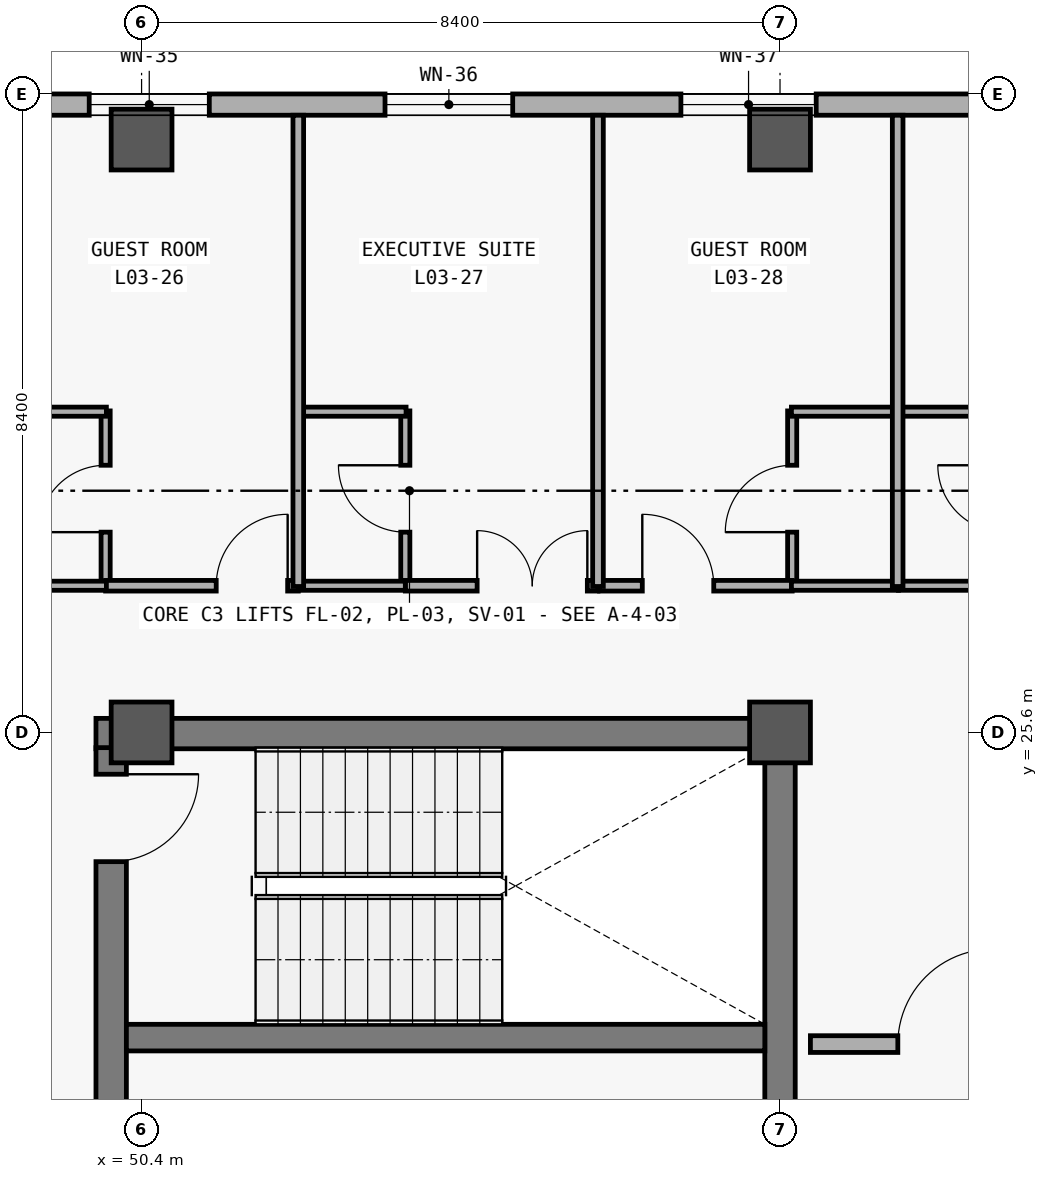
"""IFC4 building model, lengths in metres.
Left out: names, types, materials, properties, quantities, classifications, styles, units other than length and angle.
Written with IfcOpenShell. Run it as: python <this file> out.ifc"""

import sys

from ifc_helpers import new_model, si_unit, direction, frame, frame_2d, origin, origin_2d, place, context, subcontext, project, spatial, rectangle, extrude, element, fill, save


model = new_model("IFC4")
c1 = context("Model", 3, precision=1e-05, world=origin(), true_north=direction((0.0, 1.0)))
c2 = subcontext(c1, "Body", "Model", "MODEL_VIEW")
j1 = project(units=[si_unit("LENGTHUNIT", "METRE"), si_unit("PLANEANGLEUNIT", "RADIAN")], contexts=[c1])
p1 = place(None, origin())
s1 = spatial("IfcSite", under=j1, at=p1, CompositionType="ELEMENT")
p2 = place(p1, origin())
s2 = spatial("IfcBuilding", under=s1, at=p2, CompositionType="ELEMENT")
p3 = place(p2, frame((0.0, 0.0, 15.0)))
s3 = spatial("IfcBuildingStorey", under=s2, at=p3, CompositionType="ELEMENT", Elevation=15.0)
for number, where, z_axis, x_axis in (
    (1, (50.4, 25.6, 0.0), (0.0, 0.0, 1.0), (1.0, 0.0, 0.0)),
    (2, (50.4, 33.4, 0.0), (0.0, 0.0, 1.0), (1.0, 0.0, 0.0)),
    (3, (58.8, 25.6, 0.0), (0.0, 0.0, 1.0), (1.0, 0.0, 0.0)),
    (4, (58.8, 33.4, 0.0), (0.0, 0.0, 1.0), (1.0, 0.0, 0.0)),
):
    element("IfcColumn", number, at=place(p3, frame(where, z_axis=z_axis, x_axis=x_axis)), inside=s3, PredefinedType="COLUMN", context=c2, shape_type="SweptSolid", body=[
        extrude(rectangle(XDim=0.8, YDim=0.8, at=origin_2d()), origin(), (0.0, 0.0, 1.0), 4.2),
    ])
p4 = place(p3, frame((8.68, 33.86, 0.0), z_axis=(0.0, 0.0, 1.0), x_axis=(1.0, 0.0, 0.0)))
e5 = element("IfcWall", 5, at=p4, inside=s3, PredefinedType="SOLIDWALL", context=c2, shape_type="SweptSolid", body=[
    extrude(rectangle(XDim=83.44, YDim=0.28, at=frame_2d((41.72, 0.0))), origin(), (0.0, 0.0, 1.0), 3.92),
])
p5 = place(p4, frame((4.895, 0.0, 0.85)))
e6 = element("IfcOpeningElement", 6, at=p5, cuts=e5, PredefinedType="OPENING", context=c2, shape_type="SweptSolid", body=[
    extrude(rectangle(XDim=2.6, YDim=2.2, at=frame_2d((1.3, 1.1))), frame((0.0, 0.15, 0.0), z_axis=(0.0, -1.0, 0.0), x_axis=(1.0, 0.0, 0.0)), (0.0, 0.0, 1.0), 0.3),
])
p6 = place(p4, frame((13.371, 0.0, 0.85)))
e7 = element("IfcOpeningElement", 7, at=p6, cuts=e5, PredefinedType="OPENING", context=c2, shape_type="SweptSolid", body=[
    extrude(rectangle(XDim=1.7, YDim=2.0, at=frame_2d((0.85, 1.0))), frame((0.0, 0.15, 0.0), z_axis=(0.0, -1.0, 0.0), x_axis=(1.0, 0.0, 0.0)), (0.0, 0.0, 1.0), 0.3),
])
p7 = place(p4, frame((17.015, 0.0, 0.85)))
e8 = element("IfcOpeningElement", 8, at=p7, cuts=e5, PredefinedType="OPENING", context=c2, shape_type="SweptSolid", body=[
    extrude(rectangle(XDim=2.3, YDim=2.05, at=frame_2d((1.15, 1.025))), frame((0.0, 0.15, 0.0), z_axis=(0.0, -1.0, 0.0), x_axis=(1.0, 0.0, 0.0)), (0.0, 0.0, 1.0), 0.3),
])
p8 = place(p4, frame((20.732, 0.0, 0.85)))
e9 = element("IfcOpeningElement", 9, at=p8, cuts=e5, PredefinedType="OPENING", context=c2, shape_type="SweptSolid", body=[
    extrude(rectangle(XDim=2.75, YDim=2.1, at=frame_2d((1.375, 1.05))), frame((0.0, 0.15, 0.0), z_axis=(0.0, -1.0, 0.0), x_axis=(1.0, 0.0, 0.0)), (0.0, 0.0, 1.0), 0.3),
])
p9 = place(p4, frame((25.46, 0.0, 0.85)))
e10 = element("IfcOpeningElement", 10, at=p9, cuts=e5, PredefinedType="OPENING", context=c2, shape_type="SweptSolid", body=[
    extrude(rectangle(XDim=1.18, YDim=1.5, at=frame_2d((0.59, 0.75))), frame((0.0, 0.15, 0.0), z_axis=(0.0, -1.0, 0.0), x_axis=(1.0, 0.0, 0.0)), (0.0, 0.0, 1.0), 0.3),
])
p10 = place(p4, frame((29.352, 0.0, 0.85)))
e11 = element("IfcOpeningElement", 11, at=p10, cuts=e5, PredefinedType="OPENING", context=c2, shape_type="SweptSolid", body=[
    extrude(rectangle(XDim=1.28, YDim=1.6, at=frame_2d((0.64, 0.8))), frame((0.0, 0.15, 0.0), z_axis=(0.0, -1.0, 0.0), x_axis=(1.0, 0.0, 0.0)), (0.0, 0.0, 1.0), 0.3),
])
p11 = place(p4, frame((33.245, 0.0, 0.85)))
e12 = element("IfcOpeningElement", 12, at=p11, cuts=e5, PredefinedType="OPENING", context=c2, shape_type="SweptSolid", body=[
    extrude(rectangle(XDim=1.38, YDim=1.7, at=frame_2d((0.69, 0.85))), frame((0.0, 0.15, 0.0), z_axis=(0.0, -1.0, 0.0), x_axis=(1.0, 0.0, 0.0)), (0.0, 0.0, 1.0), 0.3),
])
p12 = place(p4, frame((37.138, 0.0, 0.85)))
e13 = element("IfcOpeningElement", 13, at=p12, cuts=e5, PredefinedType="OPENING", context=c2, shape_type="SweptSolid", body=[
    extrude(rectangle(XDim=1.48, YDim=1.8, at=frame_2d((0.74, 0.9))), frame((0.0, 0.15, 0.0), z_axis=(0.0, -1.0, 0.0), x_axis=(1.0, 0.0, 0.0)), (0.0, 0.0, 1.0), 0.3),
])
p13 = place(p4, frame((41.031, 0.0, 0.85)))
e14 = element("IfcOpeningElement", 14, at=p13, cuts=e5, PredefinedType="OPENING", context=c2, shape_type="SweptSolid", body=[
    extrude(rectangle(XDim=1.58, YDim=1.85, at=frame_2d((0.79, 0.925))), frame((0.0, 0.15, 0.0), z_axis=(0.0, -1.0, 0.0), x_axis=(1.0, 0.0, 0.0)), (0.0, 0.0, 1.0), 0.3),
])
p14 = place(p4, frame((44.923, 0.0, 0.85)))
e15 = element("IfcOpeningElement", 15, at=p14, cuts=e5, PredefinedType="OPENING", context=c2, shape_type="SweptSolid", body=[
    extrude(rectangle(XDim=1.68, YDim=1.9, at=frame_2d((0.84, 0.95))), frame((0.0, 0.15, 0.0), z_axis=(0.0, -1.0, 0.0), x_axis=(1.0, 0.0, 0.0)), (0.0, 0.0, 1.0), 0.3),
])
p15 = place(p4, frame((48.816, 0.0, 0.85)))
e16 = element("IfcOpeningElement", 16, at=p15, cuts=e5, PredefinedType="OPENING", context=c2, shape_type="SweptSolid", body=[
    extrude(rectangle(XDim=1.78, YDim=1.95, at=frame_2d((0.89, 0.975))), frame((0.0, 0.15, 0.0), z_axis=(0.0, -1.0, 0.0), x_axis=(1.0, 0.0, 0.0)), (0.0, 0.0, 1.0), 0.3),
])
p16 = place(p4, frame((52.71, 0.0, 0.85)))
e17 = element("IfcOpeningElement", 17, at=p16, cuts=e5, PredefinedType="OPENING", context=c2, shape_type="SweptSolid", body=[
    extrude(rectangle(XDim=1.88, YDim=1.95, at=frame_2d((0.94, 0.975))), frame((0.0, 0.15, 0.0), z_axis=(0.0, -1.0, 0.0), x_axis=(1.0, 0.0, 0.0)), (0.0, 0.0, 1.0), 0.3),
])
p17 = place(p4, frame((56.567, 0.0, 0.85)))
e18 = element("IfcOpeningElement", 18, at=p17, cuts=e5, PredefinedType="OPENING", context=c2, shape_type="SweptSolid", body=[
    extrude(rectangle(XDim=2.05, YDim=1.95, at=frame_2d((1.025, 0.975))), frame((0.0, 0.15, 0.0), z_axis=(0.0, -1.0, 0.0), x_axis=(1.0, 0.0, 0.0)), (0.0, 0.0, 1.0), 0.3),
])
p18 = place(p4, frame((60.444, 0.0, 0.85)))
e19 = element("IfcOpeningElement", 19, at=p18, cuts=e5, PredefinedType="OPENING", context=c2, shape_type="SweptSolid", body=[
    extrude(rectangle(XDim=2.18, YDim=1.95, at=frame_2d((1.09, 0.975))), frame((0.0, 0.15, 0.0), z_axis=(0.0, -1.0, 0.0), x_axis=(1.0, 0.0, 0.0)), (0.0, 0.0, 1.0), 0.3),
])
p19 = place(p4, frame((64.287, 0.0, 0.85)))
e20 = element("IfcOpeningElement", 20, at=p19, cuts=e5, PredefinedType="OPENING", context=c2, shape_type="SweptSolid", body=[
    extrude(rectangle(XDim=2.38, YDim=1.95, at=frame_2d((1.19, 0.975))), frame((0.0, 0.15, 0.0), z_axis=(0.0, -1.0, 0.0), x_axis=(1.0, 0.0, 0.0)), (0.0, 0.0, 1.0), 0.3),
])
p20 = place(p4, frame((68.181, 0.0, 0.85)))
e21 = element("IfcOpeningElement", 21, at=p20, cuts=e5, PredefinedType="OPENING", context=c2, shape_type="SweptSolid", body=[
    extrude(rectangle(XDim=2.48, YDim=2.0, at=frame_2d((1.24, 1.0))), frame((0.0, 0.15, 0.0), z_axis=(0.0, -1.0, 0.0), x_axis=(1.0, 0.0, 0.0)), (0.0, 0.0, 1.0), 0.3),
])
p21 = place(p4, frame((72.038, 0.0, 0.85)))
e22 = element("IfcOpeningElement", 22, at=p21, cuts=e5, PredefinedType="OPENING", context=c2, shape_type="SweptSolid", body=[
    extrude(rectangle(XDim=2.65, YDim=2.0, at=frame_2d((1.325, 1.0))), frame((0.0, 0.15, 0.0), z_axis=(0.0, -1.0, 0.0), x_axis=(1.0, 0.0, 0.0)), (0.0, 0.0, 1.0), 0.3),
])
p22 = place(p4, frame((75.831, 0.0, 0.85)))
e23 = element("IfcOpeningElement", 23, at=p22, cuts=e5, PredefinedType="OPENING", context=c2, shape_type="SweptSolid", body=[
    extrude(rectangle(XDim=2.95, YDim=2.05, at=frame_2d((1.475, 1.025))), frame((0.0, 0.15, 0.0), z_axis=(0.0, -1.0, 0.0), x_axis=(1.0, 0.0, 0.0)), (0.0, 0.0, 1.0), 0.3),
])
p23 = place(p4, frame((80.349, 0.0, 0.85)))
e24 = element("IfcOpeningElement", 24, at=p23, cuts=e5, PredefinedType="OPENING", context=c2, shape_type="SweptSolid", body=[
    extrude(rectangle(XDim=1.8, YDim=1.8, at=frame_2d((0.9, 0.9))), frame((0.0, 0.15, 0.0), z_axis=(0.0, -1.0, 0.0), x_axis=(1.0, 0.0, 0.0)), (0.0, 0.0, 1.0), 0.3),
])
p24 = place(p3, frame((59.0, 25.585, 0.0), z_axis=(0.0, 0.0, 1.0), x_axis=(-1.0, 0.0, 0.0)))
e25 = element("IfcWall", 25, at=p24, inside=s3, PredefinedType="SHEAR", context=c2, shape_type="SweptSolid", body=[
    extrude(rectangle(XDim=9.2, YDim=0.4, at=frame_2d((4.6, 0.0))), origin(), (0.0, 0.0, 1.0), 3.92),
])
p25 = place(p3, frame((50.0, 25.4, 0.0), z_axis=(0.0, 0.0, 1.0), x_axis=(0.0, -1.0, 0.0)))
e26 = element("IfcWall", 26, at=p25, inside=s3, PredefinedType="SHEAR", context=c2, shape_type="SweptSolid", body=[
    extrude(rectangle(XDim=7.4, YDim=0.4, at=frame_2d((3.7, 0.0))), origin(), (0.0, 0.0, 1.0), 3.92),
])
p26 = place(p25, frame((0.35, 0.0, 0.0)))
e27 = element("IfcOpeningElement", 27, at=p26, cuts=e26, PredefinedType="OPENING", context=c2, shape_type="SweptSolid", body=[
    extrude(rectangle(XDim=1.15, YDim=2.2, at=frame_2d((0.575, 1.1))), frame((0.0, 0.21, 0.0), z_axis=(0.0, -1.0, 0.0), x_axis=(1.0, 0.0, 0.0)), (0.0, 0.0, 1.0), 0.42),
])
p27 = place(p3, frame((58.8, 18.0, 0.0), z_axis=(0.0, 0.0, 1.0), x_axis=(0.0, 1.0, 0.0)))
e28 = element("IfcWall", 28, at=p27, inside=s3, PredefinedType="SHEAR", context=c2, shape_type="SweptSolid", body=[
    extrude(rectangle(XDim=7.4, YDim=0.4, at=frame_2d((3.7, 0.0))), origin(), (0.0, 0.0, 1.0), 3.92),
])
p28 = place(p3, frame((50.2, 21.585, 0.0), z_axis=(0.0, 0.0, 1.0), x_axis=(1.0, 0.0, 0.0)))
e29 = element("IfcWall", 29, at=p28, inside=s3, PredefinedType="SHEAR", context=c2, shape_type="SweptSolid", body=[
    extrude(rectangle(XDim=8.4, YDim=0.35, at=frame_2d((4.2, 0.0))), origin(), (0.0, 0.0, 1.0), 3.92),
])
p29 = place(p3, frame((59.2, 21.5, 0.0), z_axis=(0.0, 0.0, 1.0), x_axis=(1.0, 0.0, 0.0)))
e30 = element("IfcWall", 30, at=p29, inside=s3, PredefinedType="SOLIDWALL", context=c2, shape_type="SweptSolid", body=[
    extrude(rectangle(XDim=4.8, YDim=0.22, at=frame_2d((2.4, 0.0))), origin(), (0.0, 0.0, 1.0), 3.07),
])
p30 = place(p29, frame((1.15, 0.0, 0.0)))
e31 = element("IfcOpeningElement", 31, at=p30, cuts=e30, PredefinedType="OPENING", context=c2, shape_type="SweptSolid", body=[
    extrude(rectangle(XDim=1.25, YDim=2.2, at=frame_2d((0.625, 1.1))), frame((0.0, 0.12, 0.0), z_axis=(0.0, -1.0, 0.0), x_axis=(1.0, 0.0, 0.0)), (0.0, 0.0, 1.0), 0.24),
])
p31 = place(p3, frame((49.927, 27.52, 0.0), z_axis=(0.0, 0.0, 1.0), x_axis=(0.0, 1.0, 0.0)))
e32 = element("IfcWall", 32, at=p31, inside=s3, PredefinedType="PARTITIONING", context=c2, shape_type="SweptSolid", body=[
    extrude(rectangle(XDim=2.31, YDim=0.12, at=frame_2d((1.155, 0.0))), origin(), (0.0, 0.0, 1.0), 3.02),
])
p32 = place(p31, frame((0.715, 0.0, 0.0)))
e33 = element("IfcOpeningElement", 33, at=p32, cuts=e32, PredefinedType="OPENING", context=c2, shape_type="SweptSolid", body=[
    extrude(rectangle(XDim=0.88, YDim=2.15, at=frame_2d((0.44, 1.075))), frame((0.0, 0.07, 0.0), z_axis=(0.0, -1.0, 0.0), x_axis=(1.0, 0.0, 0.0)), (0.0, 0.0, 1.0), 0.14),
])
p33 = place(p3, frame((53.87, 27.52, 0.0), z_axis=(0.0, 0.0, 1.0), x_axis=(0.0, 1.0, 0.0)))
e34 = element("IfcWall", 34, at=p33, inside=s3, PredefinedType="PARTITIONING", context=c2, shape_type="SweptSolid", body=[
    extrude(rectangle(XDim=2.31, YDim=0.12, at=frame_2d((1.155, 0.0))), origin(), (0.0, 0.0, 1.0), 3.02),
])
p34 = place(p33, frame((0.715, 0.0, 0.0)))
e35 = element("IfcOpeningElement", 35, at=p34, cuts=e34, PredefinedType="OPENING", context=c2, shape_type="SweptSolid", body=[
    extrude(rectangle(XDim=0.88, YDim=2.15, at=frame_2d((0.44, 1.075))), frame((0.0, 0.07, 0.0), z_axis=(0.0, -1.0, 0.0), x_axis=(1.0, 0.0, 0.0)), (0.0, 0.0, 1.0), 0.14),
])
p35 = place(p3, frame((58.96, 27.52, 0.0), z_axis=(0.0, 0.0, 1.0), x_axis=(0.0, 1.0, 0.0)))
e36 = element("IfcWall", 36, at=p35, inside=s3, PredefinedType="PARTITIONING", context=c2, shape_type="SweptSolid", body=[
    extrude(rectangle(XDim=2.31, YDim=0.12, at=frame_2d((1.155, 0.0))), origin(), (0.0, 0.0, 1.0), 3.02),
])
p36 = place(p35, frame((0.715, 0.0, 0.0)))
e37 = element("IfcOpeningElement", 37, at=p36, cuts=e36, PredefinedType="OPENING", context=c2, shape_type="SweptSolid", body=[
    extrude(rectangle(XDim=0.88, YDim=2.15, at=frame_2d((0.44, 1.075))), frame((0.0, 0.07, 0.0), z_axis=(0.0, -1.0, 0.0), x_axis=(1.0, 0.0, 0.0)), (0.0, 0.0, 1.0), 0.14),
])
p37 = place(p3, frame((49.927, 27.53, 0.0), z_axis=(0.0, 0.0, 1.0), x_axis=(1.0, 0.0, 0.0)))
e38 = element("IfcWall", 38, at=p37, inside=s3, PredefinedType="PARTITIONING", context=c2, shape_type="SweptSolid", body=[
    extrude(rectangle(XDim=2.535, YDim=0.14, at=frame_2d((1.268, 0.0))), origin(), (0.0, 0.0, 1.0), 3.02),
])
p38 = place(p37, frame((1.455, 0.0, 0.0)))
e39 = element("IfcOpeningElement", 39, at=p38, cuts=e38, PredefinedType="OPENING", context=c2, shape_type="SweptSolid", body=[
    extrude(rectangle(XDim=0.94, YDim=2.2, at=frame_2d((0.47, 1.1))), frame((0.0, 0.08, 0.0), z_axis=(0.0, -1.0, 0.0), x_axis=(1.0, 0.0, 0.0)), (0.0, 0.0, 1.0), 0.16),
])
p39 = place(p3, frame((53.87, 27.53, 0.0), z_axis=(0.0, 0.0, 1.0), x_axis=(1.0, 0.0, 0.0)))
e40 = element("IfcWall", 40, at=p39, inside=s3, PredefinedType="PARTITIONING", context=c2, shape_type="SweptSolid", body=[
    extrude(rectangle(XDim=2.535, YDim=0.14, at=frame_2d((1.268, 0.0))), origin(), (0.0, 0.0, 1.0), 3.02),
])
p40 = place(p39, frame((0.945, 0.0, 0.0)))
e41 = element("IfcOpeningElement", 41, at=p40, cuts=e40, PredefinedType="OPENING", context=c2, shape_type="SweptSolid", body=[
    extrude(rectangle(XDim=1.45, YDim=2.3, at=frame_2d((0.725, 1.15))), frame((0.0, 0.08, 0.0), z_axis=(0.0, -1.0, 0.0), x_axis=(1.0, 0.0, 0.0)), (0.0, 0.0, 1.0), 0.16),
])
p41 = place(p3, frame((56.425, 27.53, 0.0), z_axis=(0.0, 0.0, 1.0), x_axis=(1.0, 0.0, 0.0)))
e42 = element("IfcWall", 42, at=p41, inside=s3, PredefinedType="PARTITIONING", context=c2, shape_type="SweptSolid", body=[
    extrude(rectangle(XDim=2.535, YDim=0.14, at=frame_2d((1.268, 0.0))), origin(), (0.0, 0.0, 1.0), 3.02),
])
p42 = place(p41, frame((0.563, 0.0, 0.0)))
e43 = element("IfcOpeningElement", 43, at=p42, cuts=e42, PredefinedType="OPENING", context=c2, shape_type="SweptSolid", body=[
    extrude(rectangle(XDim=0.94, YDim=2.2, at=frame_2d((0.47, 1.1))), frame((0.0, 0.08, 0.0), z_axis=(0.0, -1.0, 0.0), x_axis=(1.0, 0.0, 0.0)), (0.0, 0.0, 1.0), 0.16),
])
for number, where, z_axis, x_axis in (
    (44, (48.529, 27.53, 0.0), (0.0, 0.0, 1.0), (1.0, 0.0, 0.0)),
    (45, (48.529, 29.82, 0.0), (0.0, 0.0, 1.0), (1.0, 0.0, 0.0)),
):
    element("IfcWall", number, at=place(p3, frame(where, z_axis=z_axis, x_axis=x_axis)), inside=s3, PredefinedType="PARTITIONING", context=c2, shape_type="SweptSolid", body=[
        extrude(rectangle(XDim=1.408, YDim=0.12, at=frame_2d((0.704, 0.0))), origin(), (0.0, 0.0, 1.0), 3.02),
    ])
p43 = place(p3, frame((52.472, 27.53, 0.0), z_axis=(0.0, 0.0, 1.0), x_axis=(1.0, 0.0, 0.0)))
e46 = element("IfcWall", 46, at=p43, inside=s3, PredefinedType="PARTITIONING", context=c2, shape_type="SweptSolid", body=[
    extrude(rectangle(XDim=1.398, YDim=0.12, at=frame_2d((0.699, 0.0))), origin(), (0.0, 0.0, 1.0), 3.02),
])
for number, where, z_axis, x_axis in (
    (47, (52.472, 29.82, 0.0), (0.0, 0.0, 1.0), (1.0, 0.0, 0.0)),
    (48, (58.95, 27.53, 0.0), (0.0, 0.0, 1.0), (1.0, 0.0, 0.0)),
    (49, (58.95, 29.82, 0.0), (0.0, 0.0, 1.0), (1.0, 0.0, 0.0)),
):
    element("IfcWall", number, at=place(p3, frame(where, z_axis=z_axis, x_axis=x_axis)), inside=s3, PredefinedType="PARTITIONING", context=c2, shape_type="SweptSolid", body=[
        extrude(rectangle(XDim=1.408, YDim=0.12, at=frame_2d((0.704, 0.0))), origin(), (0.0, 0.0, 1.0), 3.02),
    ])
for number, where, z_axis, x_axis in (
    (50, (60.358, 27.53, 0.0), (0.0, 0.0, 1.0), (1.0, 0.0, 0.0)),
    (51, (60.358, 29.82, 0.0), (0.0, 0.0, 1.0), (1.0, 0.0, 0.0)),
):
    element("IfcWall", number, at=place(p3, frame(where, z_axis=z_axis, x_axis=x_axis)), inside=s3, PredefinedType="PARTITIONING", context=c2, shape_type="SweptSolid", body=[
        extrude(rectangle(XDim=1.408, YDim=0.12, at=frame_2d((0.704, 0.0))), origin(), (0.0, 0.0, 1.0), 3.02),
    ])
for number, where, z_axis, x_axis in (
    (52, (52.462, 27.52, 0.0), (0.0, 0.0, 1.0), (0.0, 1.0, 0.0)),
    (53, (56.405, 27.52, 0.0), (0.0, 0.0, 1.0), (0.0, 1.0, 0.0)),
    (54, (60.348, 27.52, 0.0), (0.0, 0.0, 1.0), (0.0, 1.0, 0.0)),
):
    element("IfcWall", number, at=place(p3, frame(where, z_axis=z_axis, x_axis=x_axis)), inside=s3, PredefinedType="PARTITIONING", context=c2, shape_type="SweptSolid", body=[
        extrude(rectangle(XDim=6.2, YDim=0.14, at=frame_2d((3.1, 0.0))), origin(), (0.0, 0.0, 1.0), 3.02),
    ])
p44 = place(p13, origin())
e55 = element("IfcWindow", 55, at=p44, inside=s3, PartitioningType="SINGLE_PANEL", PredefinedType="WINDOW", context=c2, shape_type="SweptSolid", body=[
    extrude(rectangle(XDim=1.58, YDim=1.85, at=frame_2d((0.79, 0.925))), frame((0.0, 0.03, 0.0), z_axis=(0.0, -1.0, 0.0), x_axis=(1.0, 0.0, 0.0)), (0.0, 0.0, 1.0), 0.06),
])
fill(e14, e55)
p45 = place(p14, origin())
e56 = element("IfcWindow", 56, at=p45, inside=s3, PartitioningType="SINGLE_PANEL", PredefinedType="WINDOW", context=c2, shape_type="SweptSolid", body=[
    extrude(rectangle(XDim=1.68, YDim=1.9, at=frame_2d((0.84, 0.95))), frame((0.0, 0.03, 0.0), z_axis=(0.0, -1.0, 0.0), x_axis=(1.0, 0.0, 0.0)), (0.0, 0.0, 1.0), 0.06),
])
fill(e15, e56)
p46 = place(p15, origin())
e57 = element("IfcWindow", 57, at=p46, inside=s3, PartitioningType="SINGLE_PANEL", PredefinedType="WINDOW", context=c2, shape_type="SweptSolid", body=[
    extrude(rectangle(XDim=1.78, YDim=1.95, at=frame_2d((0.89, 0.975))), frame((0.0, 0.03, 0.0), z_axis=(0.0, -1.0, 0.0), x_axis=(1.0, 0.0, 0.0)), (0.0, 0.0, 1.0), 0.06),
])
fill(e16, e57)
p47 = place(p26, origin())
e58 = element("IfcDoor", 58, at=p47, inside=s3, OperationType="SINGLE_SWING_LEFT", PredefinedType="DOOR", context=c2, shape_type="SweptSolid", body=[
    extrude(rectangle(XDim=1.15, YDim=2.2, at=frame_2d((0.575, 1.1))), frame((0.0, 0.025, 0.0), z_axis=(0.0, -1.0, 0.0), x_axis=(1.0, 0.0, 0.0)), (0.0, 0.0, 1.0), 0.05),
])
fill(e27, e58)
p48 = place(p30, origin())
e59 = element("IfcDoor", 59, at=p48, inside=s3, OperationType="SINGLE_SWING_RIGHT", PredefinedType="DOOR", context=c2, shape_type="SweptSolid", body=[
    extrude(rectangle(XDim=1.25, YDim=2.2, at=frame_2d((0.625, 1.1))), frame((0.0, 0.025, 0.0), z_axis=(0.0, -1.0, 0.0), x_axis=(1.0, 0.0, 0.0)), (0.0, 0.0, 1.0), 0.05),
])
fill(e31, e59)
p49 = place(p32, origin())
e60 = element("IfcDoor", 60, at=p49, inside=s3, OperationType="SINGLE_SWING_LEFT", PredefinedType="DOOR", context=c2, shape_type="SweptSolid", body=[
    extrude(rectangle(XDim=0.88, YDim=2.15, at=frame_2d((0.44, 1.075))), frame((0.0, 0.025, 0.0), z_axis=(0.0, -1.0, 0.0), x_axis=(1.0, 0.0, 0.0)), (0.0, 0.0, 1.0), 0.05),
])
fill(e33, e60)
p50 = place(p34, origin())
e61 = element("IfcDoor", 61, at=p50, inside=s3, OperationType="SINGLE_SWING_RIGHT", PredefinedType="DOOR", context=c2, shape_type="SweptSolid", body=[
    extrude(rectangle(XDim=0.88, YDim=2.15, at=frame_2d((0.44, 1.075))), frame((0.0, 0.025, 0.0), z_axis=(0.0, -1.0, 0.0), x_axis=(1.0, 0.0, 0.0)), (0.0, 0.0, 1.0), 0.05),
])
fill(e35, e61)
p51 = place(p36, origin())
e62 = element("IfcDoor", 62, at=p51, inside=s3, OperationType="SINGLE_SWING_LEFT", PredefinedType="DOOR", context=c2, shape_type="SweptSolid", body=[
    extrude(rectangle(XDim=0.88, YDim=2.15, at=frame_2d((0.44, 1.075))), frame((0.0, 0.025, 0.0), z_axis=(0.0, -1.0, 0.0), x_axis=(1.0, 0.0, 0.0)), (0.0, 0.0, 1.0), 0.05),
])
fill(e37, e62)
p52 = place(p38, origin())
e63 = element("IfcDoor", 63, at=p52, inside=s3, OperationType="SINGLE_SWING_RIGHT", PredefinedType="DOOR", context=c2, shape_type="SweptSolid", body=[
    extrude(rectangle(XDim=0.94, YDim=2.2, at=frame_2d((0.47, 1.1))), frame((0.0, 0.025, 0.0), z_axis=(0.0, -1.0, 0.0), x_axis=(1.0, 0.0, 0.0)), (0.0, 0.0, 1.0), 0.05),
])
fill(e39, e63)
p53 = place(p40, origin())
e64 = element("IfcDoor", 64, at=p53, inside=s3, OperationType="DOUBLE_DOOR_SINGLE_SWING", PredefinedType="DOOR", context=c2, shape_type="SweptSolid", body=[
    extrude(rectangle(XDim=1.45, YDim=2.3, at=frame_2d((0.725, 1.15))), frame((0.0, 0.025, 0.0), z_axis=(0.0, -1.0, 0.0), x_axis=(1.0, 0.0, 0.0)), (0.0, 0.0, 1.0), 0.05),
])
fill(e41, e64)
p54 = place(p42, origin())
e65 = element("IfcDoor", 65, at=p54, inside=s3, OperationType="SINGLE_SWING_LEFT", PredefinedType="DOOR", context=c2, shape_type="SweptSolid", body=[
    extrude(rectangle(XDim=0.94, YDim=2.2, at=frame_2d((0.47, 1.1))), frame((0.0, 0.025, 0.0), z_axis=(0.0, -1.0, 0.0), x_axis=(1.0, 0.0, 0.0)), (0.0, 0.0, 1.0), 0.05),
])
fill(e43, e65)
save(model, sys.argv[1])
